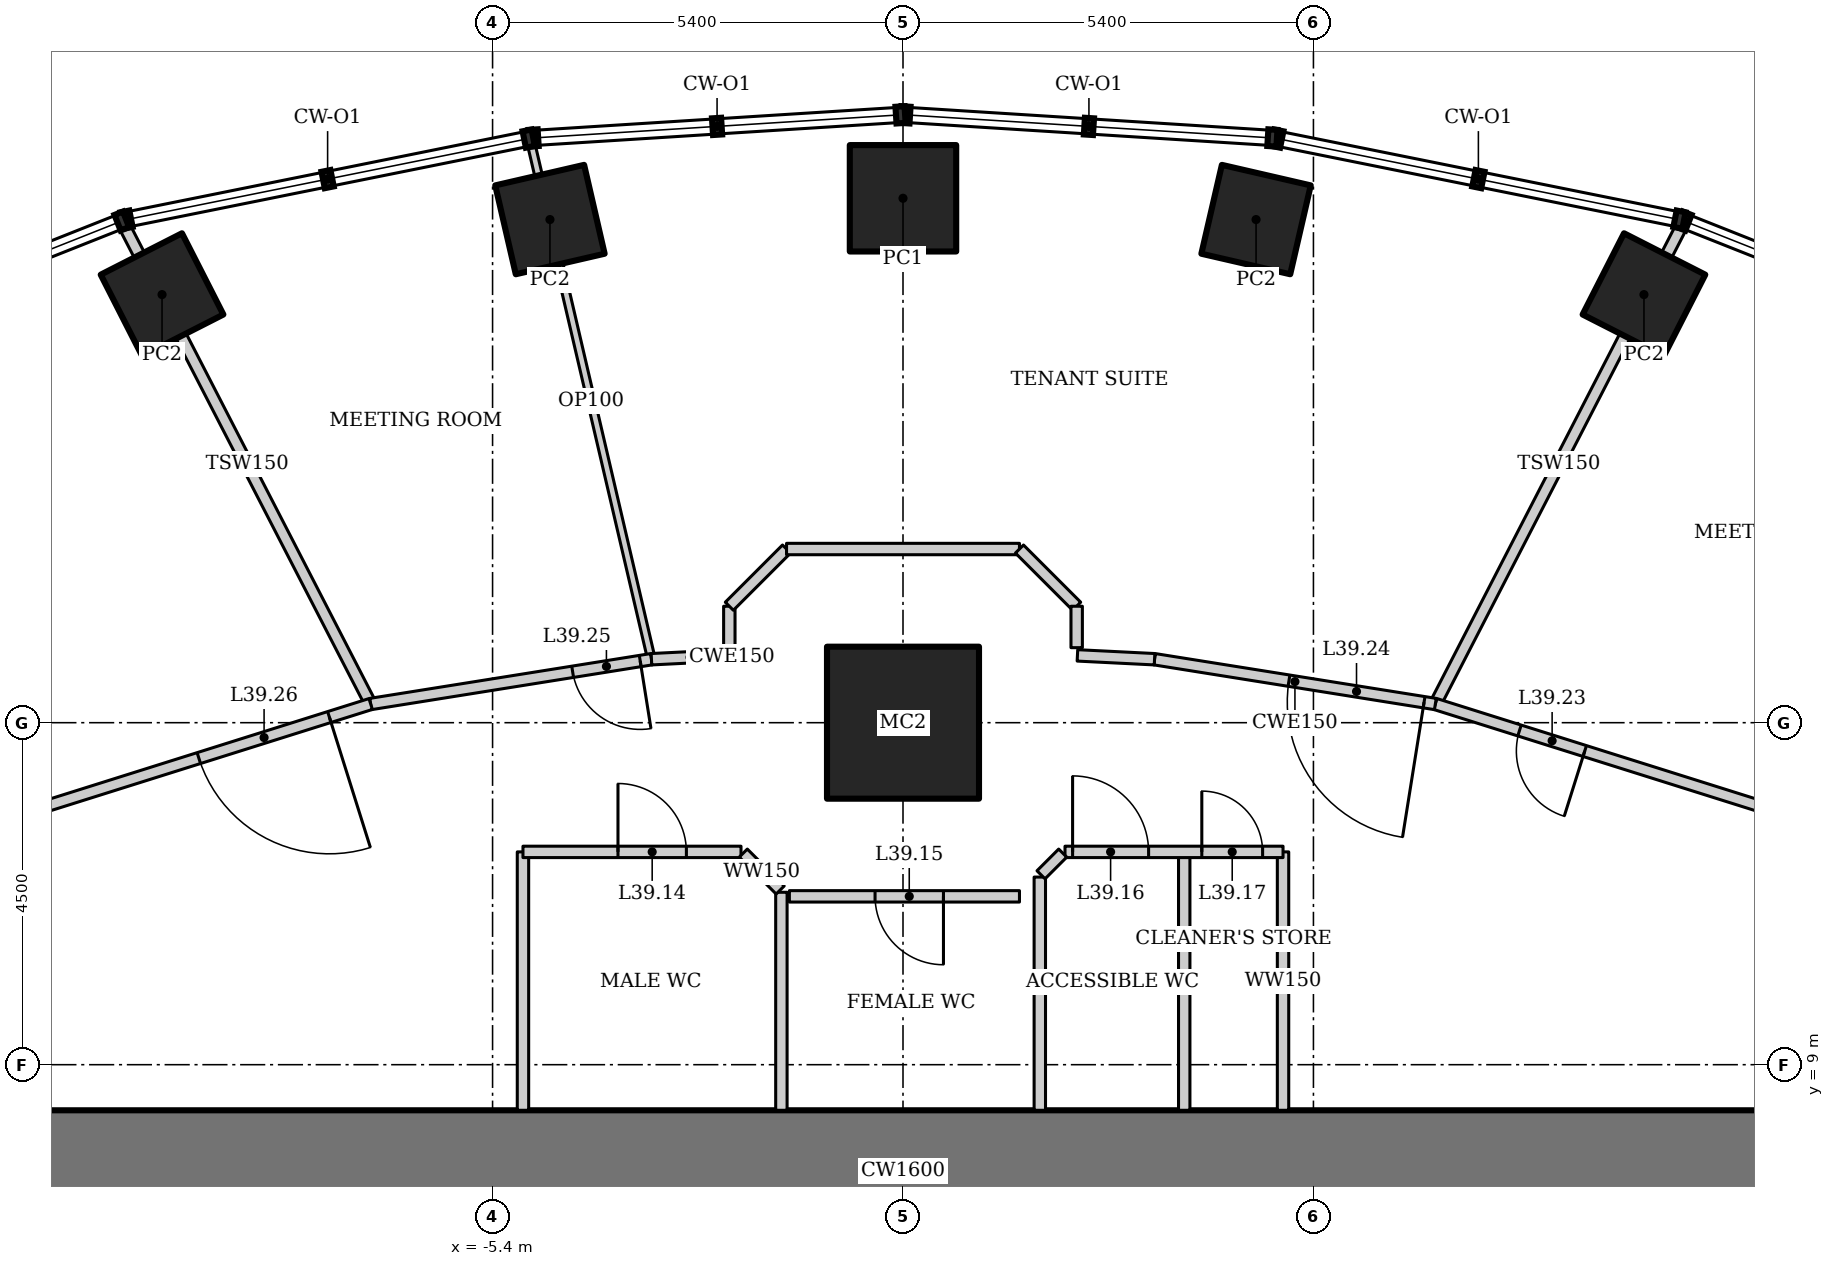
"""IFC4 building model, lengths in metres.
Left out: names, types, materials, properties, quantities, classifications, styles, units other than length and angle.
Written with IfcOpenShell. Run it as: python <this file> out.ifc"""

import sys

from ifc_helpers import new_model, si_unit, direction, frame, frame_2d, origin, origin_2d, place, context, subcontext, project, spatial, rectangle, hollow_rectangle, extrude, element, fill, save


model = new_model("IFC4")
c1 = context("Model", 3, precision=1e-05, world=origin(), true_north=direction((0.0, 1.0)))
c2 = subcontext(c1, "Body", "Model", "MODEL_VIEW")
j1 = project(units=[si_unit("LENGTHUNIT", "METRE"), si_unit("PLANEANGLEUNIT", "RADIAN")], contexts=[c1])
p1 = place(None, origin())
s1 = spatial("IfcSite", under=j1, at=p1, CompositionType="ELEMENT")
p2 = place(p1, origin())
s2 = spatial("IfcBuilding", under=s1, at=p2, CompositionType="ELEMENT")
p3 = place(p2, frame((0.0, 0.0, 167.8)))
s3 = spatial("IfcBuildingStorey", under=s2, at=p3, CompositionType="ELEMENT", Elevation=167.8)
p4 = place(p3, frame((0.0, 13.5, 0.0), z_axis=(0.0, 0.0, 1.0), x_axis=(1.0, 0.0, 0.0)))
e1 = element("IfcColumn", 1, at=p4, inside=s3, PredefinedType="COLUMN", context=c2, shape_type="SweptSolid", body=[
    extrude(hollow_rectangle(XDim=2.0, YDim=2.0, WallThickness=0.17, at=origin_2d()), origin(), (0.0, 0.0, 1.0), 4.2),
])
for number, where, z_axis, x_axis in (
    (2, (9.749, 19.133, 0.0), (0.0, 0.0, 1.0), (0.454, 0.891, 0.0)),
    (3, (4.645, 20.12, 0.0), (0.0, 0.0, 1.0), (0.225, 0.974, 0.0)),
):
    element("IfcColumn", number, at=place(p3, frame(where, z_axis=z_axis, x_axis=x_axis)), inside=s3, PredefinedType="COLUMN", context=c2, shape_type="SweptSolid", body=[
        extrude(hollow_rectangle(XDim=1.2, YDim=1.2, WallThickness=0.1, at=origin_2d()), origin(), (0.0, 0.0, 1.0), 4.2),
    ])
p5 = place(p3, frame((0.0, 20.4, 0.0), z_axis=(0.0, 0.0, 1.0), x_axis=(1.0, 0.0, 0.0)))
e4 = element("IfcColumn", 4, at=p5, inside=s3, PredefinedType="COLUMN", context=c2, shape_type="SweptSolid", body=[
    extrude(hollow_rectangle(XDim=1.4, YDim=1.4, WallThickness=0.1, at=origin_2d()), origin(), (0.0, 0.0, 1.0), 4.2),
])
for number, where, z_axis, x_axis in (
    (5, (-4.645, 20.12, 0.0), (0.0, 0.0, 1.0), (0.974, 0.225, 0.0)),
    (6, (-9.749, 19.133, 0.0), (0.0, 0.0, 1.0), (0.891, 0.454, 0.0)),
):
    element("IfcColumn", number, at=place(p3, frame(where, z_axis=z_axis, x_axis=x_axis)), inside=s3, PredefinedType="COLUMN", context=c2, shape_type="SweptSolid", body=[
        extrude(hollow_rectangle(XDim=1.2, YDim=1.2, WallThickness=0.1, at=origin_2d()), origin(), (0.0, 0.0, 1.0), 4.2),
    ])
p6 = place(p3, frame((12.2, 7.6, 0.0), z_axis=(0.0, 0.0, 1.0), x_axis=(-1.0, 0.0, 0.0)))
e7 = element("IfcWall", 7, at=p6, inside=s3, PredefinedType="SHEAR", context=c2, shape_type="SweptSolid", body=[
    extrude(rectangle(XDim=24.4, YDim=1.6, at=frame_2d((12.2, 0.0))), origin(), (0.0, 0.0, 1.0), 4.2),
])
p7 = place(p3, frame((10.253, 20.052, 0.0), z_axis=(0.0, 0.0, 1.0), x_axis=(-0.458082677592, -0.888909590729, 0.0)))
e8 = element("IfcWall", 8, at=p7, inside=s3, PredefinedType="PARTITIONING", context=c2, shape_type="SweptSolid", body=[
    extrude(rectangle(XDim=7.094, YDim=0.15, at=frame_2d((3.547, 0.0))), origin(), (0.0, 0.0, 1.0), 3.349),
])
p8 = place(p3, frame((-4.897, 21.135, 0.0), z_axis=(0.0, 0.0, 1.0), x_axis=(0.22733572198, -0.973816445493, 0.0)))
e9 = element("IfcWall", 9, at=p8, inside=s3, PredefinedType="PARTITIONING", context=c2, shape_type="SweptSolid", body=[
    extrude(rectangle(XDim=6.983, YDim=0.1, at=frame_2d((3.491, 0.0))), origin(), (0.0, 0.0, 1.0), 3.293),
])
p9 = place(p3, frame((-10.253, 20.052, 0.0), z_axis=(0.0, 0.0, 1.0), x_axis=(0.458082677592, -0.888909590729, 0.0)))
e10 = element("IfcWall", 10, at=p9, inside=s3, PredefinedType="PARTITIONING", context=c2, shape_type="SweptSolid", body=[
    extrude(rectangle(XDim=7.094, YDim=0.15, at=frame_2d((3.547, 0.0))), origin(), (0.0, 0.0, 1.0), 3.349),
])
p10 = place(p3, frame((11.813, 12.232, 0.0), z_axis=(0.0, 0.0, 1.0), x_axis=(-0.953893934057, 0.300143903101, 0.0)))
e11 = element("IfcWall", 11, at=p10, inside=s3, PredefinedType="PARTITIONING", context=c2, shape_type="SweptSolid", body=[
    extrude(rectangle(XDim=5.042, YDim=0.15, at=frame_2d((2.521, 0.0))), origin(), (0.0, 0.0, 1.0), 4.05),
])
p11 = place(p10, frame((2.98, 0.0, 0.0)))
e12 = element("IfcOpeningElement", 12, at=p11, cuts=e11, PredefinedType="OPENING", context=c2, shape_type="SweptSolid", body=[
    extrude(rectangle(XDim=0.9, YDim=2.1, at=frame_2d((0.45, 1.05))), frame((0.0, 0.085, 0.0), z_axis=(0.0, -1.0, 0.0), x_axis=(1.0, 0.0, 0.0)), (0.0, 0.0, 1.0), 0.17),
])
p12 = place(p3, frame((7.004, 13.746, 0.0), z_axis=(0.0, 0.0, 1.0), x_axis=(-0.987511396594, 0.157547585181, 0.0)))
e13 = element("IfcWall", 13, at=p12, inside=s3, PredefinedType="PARTITIONING", context=c2, shape_type="SweptSolid", body=[
    extrude(rectangle(XDim=3.741, YDim=0.15, at=frame_2d((1.87, 0.0))), origin(), (0.0, 0.0, 1.0), 4.05),
])
p13 = place(p12, frame((0.15, 0.0, 0.0)))
e14 = element("IfcOpeningElement", 14, at=p13, cuts=e13, PredefinedType="OPENING", context=c2, shape_type="SweptSolid", body=[
    extrude(rectangle(XDim=1.8, YDim=2.1, at=frame_2d((0.9, 1.05))), frame((0.0, 0.085, 0.0), z_axis=(0.0, -1.0, 0.0), x_axis=(1.0, 0.0, 0.0)), (0.0, 0.0, 1.0), 0.17),
])
p14 = place(p3, frame((-3.31, 14.335, 0.0), z_axis=(0.0, 0.0, 1.0), x_axis=(-0.987511396594, -0.157547585181, 0.0)))
e15 = element("IfcWall", 15, at=p14, inside=s3, PredefinedType="PARTITIONING", context=c2, shape_type="SweptSolid", body=[
    extrude(rectangle(XDim=3.741, YDim=0.15, at=frame_2d((1.87, 0.0))), origin(), (0.0, 0.0, 1.0), 4.05),
])
p15 = place(p14, frame((0.15, 0.0, 0.0)))
e16 = element("IfcOpeningElement", 16, at=p15, cuts=e15, PredefinedType="OPENING", context=c2, shape_type="SweptSolid", body=[
    extrude(rectangle(XDim=0.9, YDim=2.1, at=frame_2d((0.45, 1.05))), frame((0.0, 0.085, 0.0), z_axis=(0.0, -1.0, 0.0), x_axis=(1.0, 0.0, 0.0)), (0.0, 0.0, 1.0), 0.17),
])
p16 = place(p3, frame((-7.004, 13.746, 0.0), z_axis=(0.0, 0.0, 1.0), x_axis=(-0.953893934057, -0.300143903101, 0.0)))
e17 = element("IfcWall", 17, at=p16, inside=s3, PredefinedType="PARTITIONING", context=c2, shape_type="SweptSolid", body=[
    extrude(rectangle(XDim=5.042, YDim=0.15, at=frame_2d((2.521, 0.0))), origin(), (0.0, 0.0, 1.0), 4.05),
])
p17 = place(p16, frame((0.57, 0.0, 0.0)))
e18 = element("IfcOpeningElement", 18, at=p17, cuts=e17, PredefinedType="OPENING", context=c2, shape_type="SweptSolid", body=[
    extrude(rectangle(XDim=1.8, YDim=2.1, at=frame_2d((0.9, 1.05))), frame((0.0, 0.085, 0.0), z_axis=(0.0, -1.0, 0.0), x_axis=(1.0, 0.0, 0.0)), (0.0, 0.0, 1.0), 0.17),
])
for number, where, z_axis, x_axis in (
    (19, (-5.0, 8.4, 0.0), (0.0, 0.0, 1.0), (0.0, 1.0, 0.0)),
    (20, (5.0, 8.4, 0.0), (0.0, 0.0, 1.0), (0.0, 1.0, 0.0)),
    (21, (3.7, 8.4, 0.0), (0.0, 0.0, 1.0), (0.0, 1.0, 0.0)),
):
    element("IfcWall", number, at=place(p3, frame(where, z_axis=z_axis, x_axis=x_axis)), inside=s3, PredefinedType="SOLIDWALL", context=c2, shape_type="SweptSolid", body=[
        extrude(rectangle(XDim=3.4, YDim=0.15, at=frame_2d((1.7, 0.0))), origin(), (0.0, 0.0, 1.0), 4.05),
    ])
for number, where, z_axis, x_axis in (
    (22, (3.31, 14.335, 0.0), (0.0, 0.0, 1.0), (-0.999, 0.05, 0.0)),
    (23, (-2.295, 14.385, 0.0), (0.0, 0.0, 1.0), (-0.999, -0.05, 0.0)),
):
    element("IfcWall", number, at=place(p3, frame(where, z_axis=z_axis, x_axis=x_axis)), inside=s3, PredefinedType="PARTITIONING", context=c2, shape_type="SweptSolid", body=[
        extrude(rectangle(XDim=1.016, YDim=0.15, at=frame_2d((0.508, 0.0))), origin(), (0.0, 0.0, 1.0), 4.05),
    ])
p18 = place(p3, frame((-5.0, 11.8, 0.0), z_axis=(0.0, 0.0, 1.0), x_axis=(1.0, 0.0, 0.0)))
e24 = element("IfcWall", 24, at=p18, inside=s3, PredefinedType="SOLIDWALL", context=c2, shape_type="SweptSolid", body=[
    extrude(rectangle(XDim=2.869, YDim=0.15, at=frame_2d((1.434, 0.0))), origin(), (0.0, 0.0, 1.0), 4.05),
])
p19 = place(p18, frame((1.25, 0.0, 0.0)))
e25 = element("IfcOpeningElement", 25, at=p19, cuts=e24, PredefinedType="OPENING", context=c2, shape_type="SweptSolid", body=[
    extrude(rectangle(XDim=0.9, YDim=2.1, at=frame_2d((0.45, 1.05))), frame((0.0, 0.085, 0.0), z_axis=(0.0, -1.0, 0.0), x_axis=(1.0, 0.0, 0.0)), (0.0, 0.0, 1.0), 0.17),
])
p20 = place(p3, frame((2.131, 11.8, 0.0), z_axis=(0.0, 0.0, 1.0), x_axis=(1.0, 0.0, 0.0)))
e26 = element("IfcWall", 26, at=p20, inside=s3, PredefinedType="SOLIDWALL", context=c2, shape_type="SweptSolid", body=[
    extrude(rectangle(XDim=2.869, YDim=0.15, at=frame_2d((1.434, 0.0))), origin(), (0.0, 0.0, 1.0), 4.05),
])
p21 = place(p20, frame((0.1, 0.0, 0.0)))
e27 = element("IfcOpeningElement", 27, at=p21, cuts=e26, PredefinedType="OPENING", context=c2, shape_type="SweptSolid", body=[
    extrude(rectangle(XDim=1.0, YDim=2.1, at=frame_2d((0.5, 1.05))), frame((0.0, 0.085, 0.0), z_axis=(0.0, -1.0, 0.0), x_axis=(1.0, 0.0, 0.0)), (0.0, 0.0, 1.0), 0.17),
])
p22 = place(p20, frame((1.8, 0.0, 0.0)))
e28 = element("IfcOpeningElement", 28, at=p22, cuts=e26, PredefinedType="OPENING", context=c2, shape_type="SweptSolid", body=[
    extrude(rectangle(XDim=0.8, YDim=2.1, at=frame_2d((0.4, 1.05))), frame((0.0, 0.085, 0.0), z_axis=(0.0, -1.0, 0.0), x_axis=(1.0, 0.0, 0.0)), (0.0, 0.0, 1.0), 0.17),
])
p23 = place(p3, frame((-1.6, 8.4, 0.0), z_axis=(0.0, 0.0, 1.0), x_axis=(0.0, 1.0, 0.0)))
e29 = element("IfcWall", 29, at=p23, inside=s3, PredefinedType="SOLIDWALL", context=c2, shape_type="SweptSolid", body=[
    extrude(rectangle(XDim=2.869, YDim=0.15, at=frame_2d((1.434, 0.0))), origin(), (0.0, 0.0, 1.0), 4.05),
])
p24 = place(p3, frame((1.8, 8.4, 0.0), z_axis=(0.0, 0.0, 1.0), x_axis=(0.0, 1.0, 0.0)))
e30 = element("IfcWall", 30, at=p24, inside=s3, PredefinedType="SOLIDWALL", context=c2, shape_type="SweptSolid", body=[
    extrude(rectangle(XDim=3.069, YDim=0.15, at=frame_2d((1.534, 0.0))), origin(), (0.0, 0.0, 1.0), 4.05),
])
p25 = place(p3, frame((-1.616, 11.299, 0.0), z_axis=(0.0, 0.0, 1.0), x_axis=(-0.706928959799, 0.707284557867, 0.0)))
e31 = element("IfcWall", 31, at=p25, inside=s3, PredefinedType="SOLIDWALL", context=c2, shape_type="SweptSolid", body=[
    extrude(rectangle(XDim=0.687, YDim=0.15, at=frame_2d((0.343, 0.0))), origin(), (0.0, 0.0, 1.0), 4.05),
])
p26 = place(p3, frame((1.532, 11.215, 0.0), z_axis=(0.0, 0.0, 1.0), x_axis=(-1.0, 0.0, 0.0)))
e32 = element("IfcWall", 32, at=p26, inside=s3, PredefinedType="SOLIDWALL", context=c2, shape_type="SweptSolid", body=[
    extrude(rectangle(XDim=3.027, YDim=0.15, at=frame_2d((1.514, 0.0))), origin(), (0.0, 0.0, 1.0), 4.05),
])
p27 = place(p26, frame((1.0, 0.0, 0.0)))
e33 = element("IfcOpeningElement", 33, at=p27, cuts=e32, PredefinedType="OPENING", context=c2, shape_type="SweptSolid", body=[
    extrude(rectangle(XDim=0.9, YDim=2.1, at=frame_2d((0.45, 1.05))), frame((0.0, 0.085, 0.0), z_axis=(0.0, -1.0, 0.0), x_axis=(1.0, 0.0, 0.0)), (0.0, 0.0, 1.0), 0.17),
])
p28 = place(p3, frame((2.101, 11.784, 0.0), z_axis=(0.0, 0.0, 1.0), x_axis=(-0.706804405012, -0.707409028113, 0.0)))
e34 = element("IfcWall", 34, at=p28, inside=s3, PredefinedType="SOLIDWALL", context=c2, shape_type="SweptSolid", body=[
    extrude(rectangle(XDim=0.404, YDim=0.15, at=frame_2d((0.202, 0.0))), origin(), (0.0, 0.0, 1.0), 4.05),
])
p29 = place(p3, frame((-2.285, 14.487, 0.0), z_axis=(0.0, 0.0, 1.0), x_axis=(0.0, 1.0, 0.0)))
e35 = element("IfcWall", 35, at=p29, inside=s3, PredefinedType="PARTITIONING", context=c2, shape_type="SweptSolid", body=[
    extrude(rectangle(XDim=0.545, YDim=0.15, at=frame_2d((0.272, 0.0))), origin(), (0.0, 0.0, 1.0), 4.05),
])
p30 = place(p3, frame((-2.285, 15.032, 0.0), z_axis=(0.0, 0.0, 1.0), x_axis=(0.707106781187, 0.707106781187, 0.0)))
e36 = element("IfcWall", 36, at=p30, inside=s3, PredefinedType="PARTITIONING", context=c2, shape_type="SweptSolid", body=[
    extrude(rectangle(XDim=1.064, YDim=0.15, at=frame_2d((0.532, 0.0))), origin(), (0.0, 0.0, 1.0), 4.05),
])
p31 = place(p3, frame((-1.532, 15.785, 0.0), z_axis=(0.0, 0.0, 1.0), x_axis=(1.0, 0.0, 0.0)))
e37 = element("IfcWall", 37, at=p31, inside=s3, PredefinedType="PARTITIONING", context=c2, shape_type="SweptSolid", body=[
    extrude(rectangle(XDim=3.064, YDim=0.15, at=frame_2d((1.532, 0.0))), origin(), (0.0, 0.0, 1.0), 4.05),
])
p32 = place(p3, frame((1.532, 15.785, 0.0), z_axis=(0.0, 0.0, 1.0), x_axis=(0.707106781187, -0.707106781187, 0.0)))
e38 = element("IfcWall", 38, at=p32, inside=s3, PredefinedType="PARTITIONING", context=c2, shape_type="SweptSolid", body=[
    extrude(rectangle(XDim=1.064, YDim=0.15, at=frame_2d((0.532, 0.0))), origin(), (0.0, 0.0, 1.0), 4.05),
])
p33 = place(p3, frame((2.285, 15.032, 0.0), z_axis=(0.0, 0.0, 1.0), x_axis=(0.0, -1.0, 0.0)))
e39 = element("IfcWall", 39, at=p33, inside=s3, PredefinedType="PARTITIONING", context=c2, shape_type="SweptSolid", body=[
    extrude(rectangle(XDim=0.545, YDim=0.15, at=frame_2d((0.272, 0.0))), origin(), (0.0, 0.0, 1.0), 4.05),
])
p34 = place(p19, origin())
e40 = element("IfcDoor", 40, at=p34, inside=s3, OperationType="SINGLE_SWING_LEFT", PredefinedType="DOOR", context=c2, shape_type="SweptSolid", body=[
    extrude(rectangle(XDim=0.9, YDim=2.1, at=frame_2d((0.45, 1.05))), frame((0.0, 0.025, 0.0), z_axis=(0.0, -1.0, 0.0), x_axis=(1.0, 0.0, 0.0)), (0.0, 0.0, 1.0), 0.05),
])
fill(e25, e40)
p35 = place(p27, origin())
e41 = element("IfcDoor", 41, at=p35, inside=s3, OperationType="SINGLE_SWING_LEFT", PredefinedType="DOOR", context=c2, shape_type="SweptSolid", body=[
    extrude(rectangle(XDim=0.9, YDim=2.1, at=frame_2d((0.45, 1.05))), frame((0.0, 0.025, 0.0), z_axis=(0.0, -1.0, 0.0), x_axis=(1.0, 0.0, 0.0)), (0.0, 0.0, 1.0), 0.05),
])
fill(e33, e41)
p36 = place(p21, origin())
e42 = element("IfcDoor", 42, at=p36, inside=s3, OperationType="SINGLE_SWING_LEFT", PredefinedType="DOOR", context=c2, shape_type="SweptSolid", body=[
    extrude(rectangle(XDim=1.0, YDim=2.1, at=frame_2d((0.5, 1.05))), frame((0.0, 0.025, 0.0), z_axis=(0.0, -1.0, 0.0), x_axis=(1.0, 0.0, 0.0)), (0.0, 0.0, 1.0), 0.05),
])
fill(e27, e42)
p37 = place(p22, origin())
e43 = element("IfcDoor", 43, at=p37, inside=s3, OperationType="SINGLE_SWING_LEFT", PredefinedType="DOOR", context=c2, shape_type="SweptSolid", body=[
    extrude(rectangle(XDim=0.8, YDim=2.1, at=frame_2d((0.4, 1.05))), frame((0.0, 0.025, 0.0), z_axis=(0.0, -1.0, 0.0), x_axis=(1.0, 0.0, 0.0)), (0.0, 0.0, 1.0), 0.05),
])
fill(e28, e43)
p38 = place(p11, origin())
e44 = element("IfcDoor", 44, at=p38, inside=s3, OperationType="SINGLE_SWING_LEFT", PredefinedType="DOOR", context=c2, shape_type="SweptSolid", body=[
    extrude(rectangle(XDim=0.9, YDim=2.1, at=frame_2d((0.45, 1.05))), frame((0.0, 0.025, 0.0), z_axis=(0.0, -1.0, 0.0), x_axis=(1.0, 0.0, 0.0)), (0.0, 0.0, 1.0), 0.05),
])
fill(e12, e44)
p39 = place(p13, origin())
e45 = element("IfcDoor", 45, at=p39, inside=s3, OperationType="DOUBLE_DOOR_DOUBLE_SWING", PredefinedType="DOOR", context=c2, shape_type="SweptSolid", body=[
    extrude(rectangle(XDim=1.8, YDim=2.1, at=frame_2d((0.9, 1.05))), frame((0.0, 0.025, 0.0), z_axis=(0.0, -1.0, 0.0), x_axis=(1.0, 0.0, 0.0)), (0.0, 0.0, 1.0), 0.05),
])
fill(e14, e45)
p40 = place(p15, origin())
e46 = element("IfcDoor", 46, at=p40, inside=s3, OperationType="SINGLE_SWING_LEFT", PredefinedType="DOOR", context=c2, shape_type="SweptSolid", body=[
    extrude(rectangle(XDim=0.9, YDim=2.1, at=frame_2d((0.45, 1.05))), frame((0.0, 0.025, 0.0), z_axis=(0.0, -1.0, 0.0), x_axis=(1.0, 0.0, 0.0)), (0.0, 0.0, 1.0), 0.05),
])
fill(e16, e46)
p41 = place(p17, origin())
e47 = element("IfcDoor", 47, at=p41, inside=s3, OperationType="DOUBLE_DOOR_DOUBLE_SWING", PredefinedType="DOOR", context=c2, shape_type="SweptSolid", body=[
    extrude(rectangle(XDim=1.8, YDim=2.1, at=frame_2d((0.9, 1.05))), frame((0.0, 0.025, 0.0), z_axis=(0.0, -1.0, 0.0), x_axis=(1.0, 0.0, 0.0)), (0.0, 0.0, 1.0), 0.05),
])
fill(e18, e47)
save(model, sys.argv[1])
